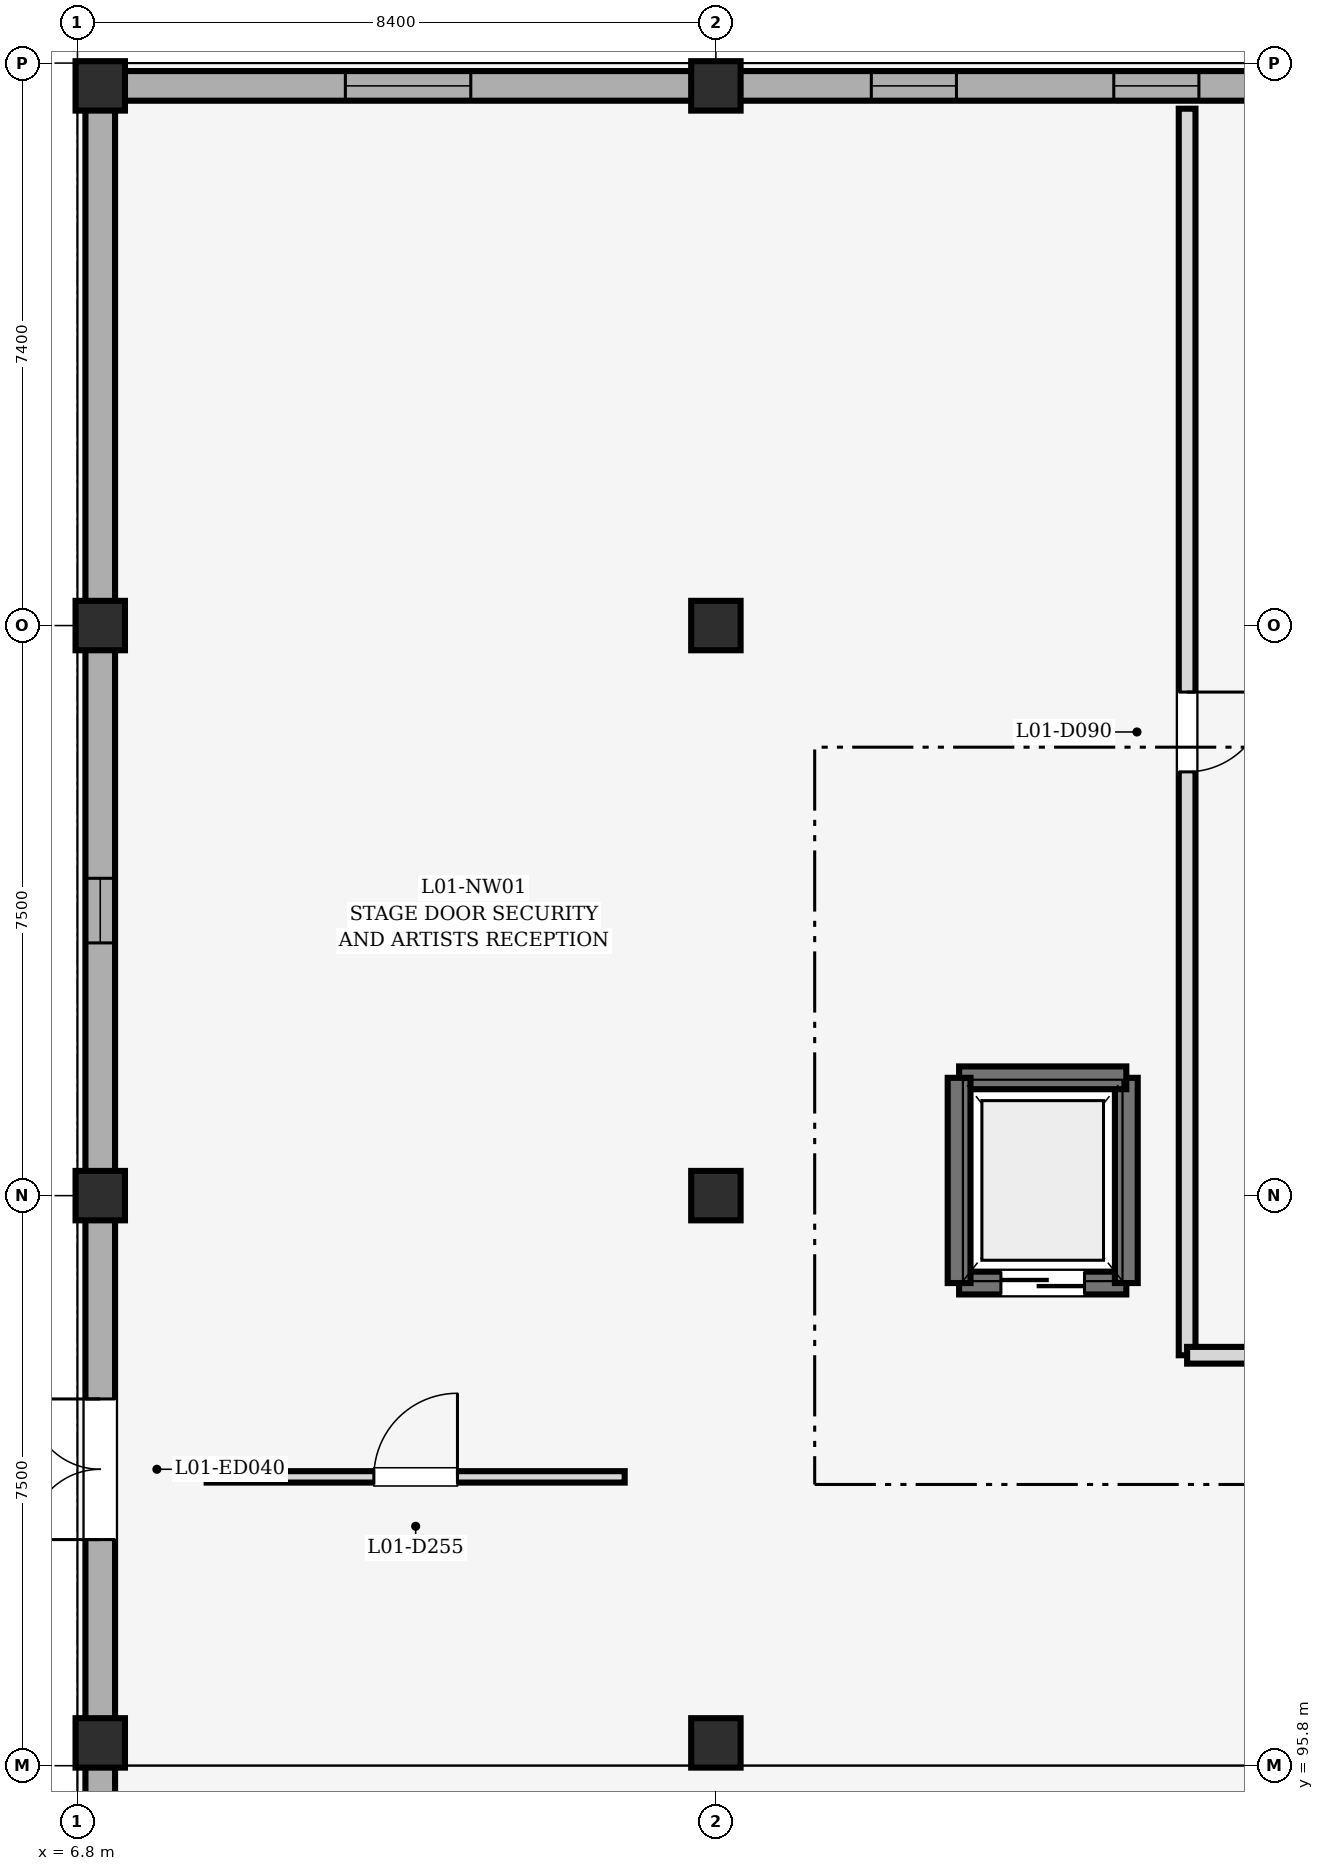
"""IFC4 building model, lengths in metres.
Left out: names, types, materials, properties, quantities, classifications, styles, units other than length and angle.
Written with IfcOpenShell. Run it as: python <this file> out.ifc"""

import sys

from ifc_helpers import new_model, si_unit, direction, frame, frame_2d, origin, origin_2d, place, context, subcontext, project, spatial, rectangle, extrude, element, fill, save


model = new_model("IFC4")
c1 = context("Model", 3, precision=1e-05, world=origin(), true_north=direction((0.0, 1.0)))
c2 = subcontext(c1, "Body", "Model", "MODEL_VIEW")
j1 = project(units=[si_unit("LENGTHUNIT", "METRE"), si_unit("PLANEANGLEUNIT", "RADIAN")], contexts=[c1])
p1 = place(None, origin())
s1 = spatial("IfcSite", under=j1, at=p1, CompositionType="ELEMENT")
p2 = place(p1, origin())
s2 = spatial("IfcBuilding", under=s1, at=p2, CompositionType="ELEMENT")
p3 = place(p2, origin())
s3 = spatial("IfcBuildingStorey", under=s2, at=p3, CompositionType="ELEMENT", Elevation=0.0)
for number, where, z_axis, x_axis in (
    (1, (7.1, 96.1, 0.0), (0.0, 0.0, 1.0), (1.0, 0.0, 0.0)),
    (2, (7.1, 103.3, 0.0), (0.0, 0.0, 1.0), (1.0, 0.0, 0.0)),
    (3, (7.1, 110.8, 0.0), (0.0, 0.0, 1.0), (1.0, 0.0, 0.0)),
    (4, (7.1, 117.9, 0.0), (0.0, 0.0, 1.0), (1.0, 0.0, 0.0)),
    (5, (15.2, 96.1, 0.0), (0.0, 0.0, 1.0), (1.0, 0.0, 0.0)),
    (6, (15.2, 103.3, 0.0), (0.0, 0.0, 1.0), (1.0, 0.0, 0.0)),
    (7, (15.2, 110.8, 0.0), (0.0, 0.0, 1.0), (1.0, 0.0, 0.0)),
    (8, (15.2, 117.9, 0.0), (0.0, 0.0, 1.0), (1.0, 0.0, 0.0)),
):
    element("IfcColumn", number, at=place(p3, frame(where, z_axis=z_axis, x_axis=x_axis)), inside=s3, PredefinedType="COLUMN", context=c2, shape_type="SweptSolid", body=[
        extrude(rectangle(XDim=0.65, YDim=0.65, at=origin_2d()), origin(), (0.0, 0.0, 1.0), 5.4),
    ])
p4 = place(p3, frame((7.1, 89.51, 0.0), z_axis=(0.0, 0.0, 1.0), x_axis=(0.0, 1.0, 0.0)))
e9 = element("IfcWall", 9, at=p4, inside=s3, PredefinedType="STANDARD", context=c2, shape_type="SweptSolid", body=[
    extrude(rectangle(XDim=6.28, YDim=0.39, at=frame_2d((3.14, 0.0))), origin(), (0.0, 0.0, 1.0), 4.599),
])
p5 = place(p4, frame((2.665, 0.0, 0.85)))
e10 = element("IfcOpeningElement", 10, at=p5, cuts=e9, PredefinedType="OPENING", context=c2, shape_type="SweptSolid", body=[
    extrude(rectangle(XDim=0.95, YDim=2.2, at=frame_2d((0.475, 1.1))), frame((0.0, 0.207, 0.0), z_axis=(0.0, -1.0, 0.0), x_axis=(1.0, 0.0, 0.0)), (0.0, 0.0, 1.0), 0.414),
])
p6 = place(p3, frame((7.1, 96.41, 0.0), z_axis=(0.0, 0.0, 1.0), x_axis=(0.0, 1.0, 0.0)))
e11 = element("IfcWall", 11, at=p6, inside=s3, PredefinedType="STANDARD", context=c2, shape_type="SweptSolid", body=[
    extrude(rectangle(XDim=6.58, YDim=0.39, at=frame_2d((3.29, 0.0))), origin(), (0.0, 0.0, 1.0), 4.6),
])
p7 = place(p6, frame((2.365, 0.0, 0.0)))
e12 = element("IfcOpeningElement", 12, at=p7, cuts=e11, PredefinedType="OPENING", context=c2, shape_type="SweptSolid", body=[
    extrude(rectangle(XDim=1.85, YDim=2.25, at=frame_2d((0.925, 1.125))), frame((0.0, 0.207, 0.0), z_axis=(0.0, -1.0, 0.0), x_axis=(1.0, 0.0, 0.0)), (0.0, 0.0, 1.0), 0.414),
])
p8 = place(p3, frame((7.1, 103.61, 0.0), z_axis=(0.0, 0.0, 1.0), x_axis=(0.0, 1.0, 0.0)))
e13 = element("IfcWall", 13, at=p8, inside=s3, PredefinedType="STANDARD", context=c2, shape_type="SweptSolid", body=[
    extrude(rectangle(XDim=6.88, YDim=0.39, at=frame_2d((3.44, 0.0))), origin(), (0.0, 0.0, 1.0), 4.377),
])
p9 = place(p8, frame((3.015, 0.0, 0.85)))
e14 = element("IfcOpeningElement", 14, at=p9, cuts=e13, PredefinedType="OPENING", context=c2, shape_type="SweptSolid", body=[
    extrude(rectangle(XDim=0.85, YDim=1.95, at=frame_2d((0.425, 0.975))), frame((0.0, 0.207, 0.0), z_axis=(0.0, -1.0, 0.0), x_axis=(1.0, 0.0, 0.0)), (0.0, 0.0, 1.0), 0.414),
])
p10 = place(p3, frame((7.1, 111.11, 0.0), z_axis=(0.0, 0.0, 1.0), x_axis=(0.0, 1.0, 0.0)))
e15 = element("IfcWall", 15, at=p10, inside=s3, PredefinedType="STANDARD", context=c2, shape_type="SweptSolid", body=[
    extrude(rectangle(XDim=6.48, YDim=0.39, at=frame_2d((3.24, 0.0))), origin(), (0.0, 0.0, 1.0), 4.427),
])
p11 = place(p3, frame((7.41, 117.9, 0.0), z_axis=(0.0, 0.0, 1.0), x_axis=(1.0, 0.0, 0.0)))
e16 = element("IfcWall", 16, at=p11, inside=s3, PredefinedType="STANDARD", context=c2, shape_type="SweptSolid", body=[
    extrude(rectangle(XDim=7.48, YDim=0.39, at=frame_2d((3.74, 0.0))), origin(), (0.0, 0.0, 1.0), 4.525),
])
p12 = place(p11, frame((2.915, 0.0, 0.85)))
e17 = element("IfcOpeningElement", 17, at=p12, cuts=e16, PredefinedType="OPENING", context=c2, shape_type="SweptSolid", body=[
    extrude(rectangle(XDim=1.65, YDim=1.95, at=frame_2d((0.825, 0.975))), frame((0.0, 0.207, 0.0), z_axis=(0.0, -1.0, 0.0), x_axis=(1.0, 0.0, 0.0)), (0.0, 0.0, 1.0), 0.414),
])
p13 = place(p3, frame((15.51, 117.9, 0.0), z_axis=(0.0, 0.0, 1.0), x_axis=(1.0, 0.0, 0.0)))
e18 = element("IfcWall", 18, at=p13, inside=s3, PredefinedType="STANDARD", context=c2, shape_type="SweptSolid", body=[
    extrude(rectangle(XDim=7.78, YDim=0.39, at=frame_2d((3.89, 0.0))), origin(), (0.0, 0.0, 1.0), 4.427),
])
p14 = place(p13, frame((1.735, 0.0, 0.85)))
e19 = element("IfcOpeningElement", 19, at=p14, cuts=e18, PredefinedType="OPENING", context=c2, shape_type="SweptSolid", body=[
    extrude(rectangle(XDim=1.12, YDim=1.75, at=frame_2d((0.56, 0.875))), frame((0.0, 0.207, 0.0), z_axis=(0.0, -1.0, 0.0), x_axis=(1.0, 0.0, 0.0)), (0.0, 0.0, 1.0), 0.414),
])
p15 = place(p13, frame((4.925, 0.0, 0.85)))
e20 = element("IfcOpeningElement", 20, at=p15, cuts=e18, PredefinedType="OPENING", context=c2, shape_type="SweptSolid", body=[
    extrude(rectangle(XDim=1.12, YDim=1.75, at=frame_2d((0.56, 0.875))), frame((0.0, 0.207, 0.0), z_axis=(0.0, -1.0, 0.0), x_axis=(1.0, 0.0, 0.0)), (0.0, 0.0, 1.0), 0.414),
])
p16 = place(p3, frame((20.6, 102.15, 0.0), z_axis=(0.0, 0.0, 1.0), x_axis=(-1.0, 0.0, 0.0)))
e21 = element("IfcWall", 21, at=p16, inside=s3, PredefinedType="SHEAR", context=c2, shape_type="SweptSolid", body=[
    extrude(rectangle(XDim=2.2, YDim=0.3, at=frame_2d((1.1, 0.0))), origin(), (0.0, 0.0, 1.0), 5.14),
])
p17 = place(p16, frame((0.55, 0.0, 0.0)))
e22 = element("IfcOpeningElement", 22, at=p17, cuts=e21, PredefinedType="OPENING", context=c2, shape_type="SweptSolid", body=[
    extrude(rectangle(XDim=1.1, YDim=2.15, at=frame_2d((0.55, 1.075))), frame((0.0, 0.162, 0.0), z_axis=(0.0, -1.0, 0.0), x_axis=(1.0, 0.0, 0.0)), (0.0, 0.0, 1.0), 0.324),
])
p18 = place(p3, frame((20.6, 104.85, 0.0), z_axis=(0.0, 0.0, 1.0), x_axis=(0.0, -1.0, 0.0)))
e23 = element("IfcWall", 23, at=p18, inside=s3, PredefinedType="SHEAR", context=c2, shape_type="SweptSolid", body=[
    extrude(rectangle(XDim=2.7, YDim=0.3, at=frame_2d((1.35, 0.0))), origin(), (0.0, 0.0, 1.0), 5.14),
])
p19 = place(p3, frame((18.4, 104.85, 0.0), z_axis=(0.0, 0.0, 1.0), x_axis=(1.0, 0.0, 0.0)))
e24 = element("IfcWall", 24, at=p19, inside=s3, PredefinedType="SHEAR", context=c2, shape_type="SweptSolid", body=[
    extrude(rectangle(XDim=2.2, YDim=0.3, at=frame_2d((1.1, 0.0))), origin(), (0.0, 0.0, 1.0), 5.14),
])
p20 = place(p3, frame((18.4, 102.15, 0.0), z_axis=(0.0, 0.0, 1.0), x_axis=(0.0, 1.0, 0.0)))
e25 = element("IfcWall", 25, at=p20, inside=s3, PredefinedType="SHEAR", context=c2, shape_type="SweptSolid", body=[
    extrude(rectangle(XDim=2.7, YDim=0.3, at=frame_2d((1.35, 0.0))), origin(), (0.0, 0.0, 1.0), 5.14),
])
p21 = place(p3, frame((21.4, 117.6, 0.0), z_axis=(0.0, 0.0, 1.0), x_axis=(0.0, -1.0, 0.0)))
e26 = element("IfcWall", 26, at=p21, inside=s3, PredefinedType="SOLIDWALL", context=c2, shape_type="SweptSolid", body=[
    extrude(rectangle(XDim=16.4, YDim=0.22, at=frame_2d((8.2, 0.0))), origin(), (0.0, 0.0, 1.0), 5.125),
])
p22 = place(p21, frame((7.675, 0.0, 0.0)))
e27 = element("IfcOpeningElement", 27, at=p22, cuts=e26, PredefinedType="OPENING", context=c2, shape_type="SweptSolid", body=[
    extrude(rectangle(XDim=1.05, YDim=2.15, at=frame_2d((0.525, 1.075))), frame((0.0, 0.122, 0.0), z_axis=(0.0, -1.0, 0.0), x_axis=(1.0, 0.0, 0.0)), (0.0, 0.0, 1.0), 0.244),
])
p23 = place(p3, frame((21.4, 101.2, 0.0), z_axis=(0.0, 0.0, 1.0), x_axis=(1.0, 0.0, 0.0)))
e28 = element("IfcWall", 28, at=p23, inside=s3, PredefinedType="SOLIDWALL", context=c2, shape_type="SweptSolid", body=[
    extrude(rectangle(XDim=3.9, YDim=0.22, at=frame_2d((1.95, 0.0))), origin(), (0.0, 0.0, 1.0), 5.125),
])
p24 = place(p3, frame((8.5, 99.6, 0.0), z_axis=(0.0, 0.0, 1.0), x_axis=(1.0, 0.0, 0.0)))
e29 = element("IfcWall", 29, at=p24, inside=s3, PredefinedType="PARTITIONING", context=c2, shape_type="SweptSolid", body=[
    extrude(rectangle(XDim=5.5, YDim=0.15, at=frame_2d((2.75, 0.0))), origin(), (0.0, 0.0, 1.0), 4.724),
])
p25 = place(p24, frame((2.2, 0.0, 0.0)))
e30 = element("IfcOpeningElement", 30, at=p25, cuts=e29, PredefinedType="OPENING", context=c2, shape_type="SweptSolid", body=[
    extrude(rectangle(XDim=1.1, YDim=2.2, at=frame_2d((0.55, 1.1))), frame((0.0, 0.087, 0.0), z_axis=(0.0, -1.0, 0.0), x_axis=(1.0, 0.0, 0.0)), (0.0, 0.0, 1.0), 0.174),
])
p26 = place(p7, origin())
e31 = element("IfcDoor", 31, at=p26, inside=s3, OperationType="DOUBLE_DOOR_SINGLE_SWING", PredefinedType="DOOR", context=c2, shape_type="SweptSolid", body=[
    extrude(rectangle(XDim=1.85, YDim=2.25, at=frame_2d((0.925, 1.125))), frame((0.0, 0.025, 0.0), z_axis=(0.0, -1.0, 0.0), x_axis=(1.0, 0.0, 0.0)), (0.0, 0.0, 1.0), 0.05),
])
fill(e12, e31)
p27 = place(p9, origin())
e32 = element("IfcWindow", 32, at=p27, inside=s3, PartitioningType="DOUBLE_PANEL_VERTICAL", PredefinedType="WINDOW", context=c2, shape_type="SweptSolid", body=[
    extrude(rectangle(XDim=0.85, YDim=1.95, at=frame_2d((0.425, 0.975))), frame((0.0, 0.03, 0.0), z_axis=(0.0, -1.0, 0.0), x_axis=(1.0, 0.0, 0.0)), (0.0, 0.0, 1.0), 0.06),
])
fill(e14, e32)
p28 = place(p12, origin())
e33 = element("IfcWindow", 33, at=p28, inside=s3, PartitioningType="DOUBLE_PANEL_VERTICAL", PredefinedType="WINDOW", context=c2, shape_type="SweptSolid", body=[
    extrude(rectangle(XDim=1.65, YDim=1.95, at=frame_2d((0.825, 0.975))), frame((0.0, 0.03, 0.0), z_axis=(0.0, -1.0, 0.0), x_axis=(1.0, 0.0, 0.0)), (0.0, 0.0, 1.0), 0.06),
])
fill(e17, e33)
p29 = place(p14, origin())
e34 = element("IfcWindow", 34, at=p29, inside=s3, PartitioningType="DOUBLE_PANEL_VERTICAL", PredefinedType="WINDOW", context=c2, shape_type="SweptSolid", body=[
    extrude(rectangle(XDim=1.12, YDim=1.75, at=frame_2d((0.56, 0.875))), frame((0.0, 0.03, 0.0), z_axis=(0.0, -1.0, 0.0), x_axis=(1.0, 0.0, 0.0)), (0.0, 0.0, 1.0), 0.06),
])
fill(e19, e34)
p30 = place(p15, origin())
e35 = element("IfcWindow", 35, at=p30, inside=s3, PartitioningType="DOUBLE_PANEL_VERTICAL", PredefinedType="WINDOW", context=c2, shape_type="SweptSolid", body=[
    extrude(rectangle(XDim=1.12, YDim=1.75, at=frame_2d((0.56, 0.875))), frame((0.0, 0.03, 0.0), z_axis=(0.0, -1.0, 0.0), x_axis=(1.0, 0.0, 0.0)), (0.0, 0.0, 1.0), 0.06),
])
fill(e20, e35)
p31 = place(p17, origin())
e36 = element("IfcDoor", 36, at=p31, inside=s3, OperationType="DOUBLE_DOOR_SLIDING", PredefinedType="DOOR", context=c2, shape_type="SweptSolid", body=[
    extrude(rectangle(XDim=1.1, YDim=2.15, at=frame_2d((0.55, 1.075))), frame((0.0, 0.025, 0.0), z_axis=(0.0, -1.0, 0.0), x_axis=(1.0, 0.0, 0.0)), (0.0, 0.0, 1.0), 0.05),
])
fill(e22, e36)
p32 = place(p22, origin())
e37 = element("IfcDoor", 37, at=p32, inside=s3, OperationType="SINGLE_SWING_LEFT", PredefinedType="DOOR", context=c2, shape_type="SweptSolid", body=[
    extrude(rectangle(XDim=1.05, YDim=2.15, at=frame_2d((0.525, 1.075))), frame((0.0, 0.025, 0.0), z_axis=(0.0, -1.0, 0.0), x_axis=(1.0, 0.0, 0.0)), (0.0, 0.0, 1.0), 0.05),
])
fill(e27, e37)
p33 = place(p25, origin())
e38 = element("IfcDoor", 38, at=p33, inside=s3, OperationType="SINGLE_SWING_RIGHT", PredefinedType="DOOR", context=c2, shape_type="SweptSolid", body=[
    extrude(rectangle(XDim=1.1, YDim=2.2, at=frame_2d((0.55, 1.1))), frame((0.0, 0.025, 0.0), z_axis=(0.0, -1.0, 0.0), x_axis=(1.0, 0.0, 0.0)), (0.0, 0.0, 1.0), 0.05),
])
fill(e30, e38)
save(model, sys.argv[1])
